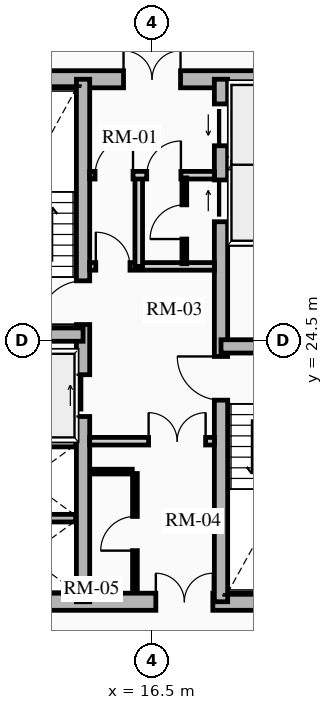
"""IFC4 building model, lengths in metres.
Left out: names, types, materials, properties, quantities, classifications, styles, units other than length and angle.
Written with IfcOpenShell. Run it as: python <this file> out.ifc"""

import sys

from ifc_helpers import new_model, si_unit, direction, frame, frame_2d, origin, place, context, subcontext, project, spatial, rectangle, extrude, source, transform, mapped, element, fill, save


model = new_model("IFC4")
c1 = context("Model", 3, precision=1e-05, world=origin(), true_north=direction((0.0, 1.0)))
c2 = subcontext(c1, "Body", "Model", "MODEL_VIEW")
j1 = project(units=[si_unit("LENGTHUNIT", "METRE"), si_unit("PLANEANGLEUNIT", "RADIAN")], contexts=[c1])
p1 = place(None, origin())
s1 = spatial("IfcSite", under=j1, at=p1, CompositionType="ELEMENT")
p2 = place(p1, origin())
s2 = spatial("IfcBuilding", under=s1, at=p2, CompositionType="ELEMENT")
p3 = place(p2, frame((0.0, 0.0, 87.61)))
s3 = spatial("IfcBuildingStorey", under=s2, at=p3, CompositionType="ELEMENT", Elevation=87.61)
p4 = place(p3, frame((11.15, 17.625, 0.0), z_axis=(0.0, 0.0, 1.0), x_axis=(1.0, 0.0, 0.0)))
e1 = element("IfcWall", 1, at=p4, inside=s3, PredefinedType="SHEAR", context=c2, shape_type="SweptSolid", body=[
    extrude(rectangle(XDim=10.7, YDim=0.45, at=frame_2d((5.35, 0.0))), origin(), (0.0, 0.0, 1.0), 2.91),
])
m1 = source(origin(), c2, "Body", "SweptSolid", [
    extrude(rectangle(XDim=1.5, YDim=2.02, at=frame_2d((0.75, 1.01))), frame((0.0, 0.235, 0.0), z_axis=(0.0, -1.0, 0.0), x_axis=(1.0, 0.0, 0.0)), (0.0, 0.0, 1.0), 0.47),
])
p5 = place(p4, frame((5.45, 0.0, 0.0)))
e2 = element("IfcOpeningElement", 2, at=p5, cuts=e1, PredefinedType="OPENING", context=c2, shape_type="MappedRepresentation", body=[
    mapped(m1, transform((0.0, 0.0, 0.0), x_axis=(1.0, 0.0, 0.0), y_axis=(0.0, 1.0, 0.0), z_axis=(0.0, 0.0, 1.0), scale=1.0)),
])
p6 = place(p3, frame((11.15, 31.375, 0.0), z_axis=(0.0, 0.0, 1.0), x_axis=(1.0, 0.0, 0.0)))
e3 = element("IfcWall", 3, at=p6, inside=s3, PredefinedType="SHEAR", context=c2, shape_type="SweptSolid", body=[
    extrude(rectangle(XDim=10.7, YDim=0.45, at=frame_2d((5.35, 0.0))), origin(), (0.0, 0.0, 1.0), 2.91),
])
p7 = place(p6, frame((4.6, 0.0, 0.0)))
e4 = element("IfcOpeningElement", 4, at=p7, cuts=e3, PredefinedType="OPENING", context=c2, shape_type="MappedRepresentation", body=[
    mapped(m1, transform((0.0, 0.0, 0.0), x_axis=(1.0, 0.0, 0.0), y_axis=(0.0, 1.0, 0.0), z_axis=(0.0, 0.0, 1.0), scale=1.0)),
])
p8 = place(p3, frame((14.685, 17.625, 0.0), z_axis=(0.0, 0.0, 1.0), x_axis=(0.0, 1.0, 0.0)))
e5 = element("IfcWall", 5, at=p8, inside=s3, PredefinedType="SHEAR", context=c2, shape_type="SweptSolid", body=[
    extrude(rectangle(XDim=13.75, YDim=0.35, at=frame_2d((6.875, 0.0))), origin(), (0.0, 0.0, 1.0), 2.91),
])
m2 = source(origin(), c2, "Body", "SweptSolid", [
    extrude(rectangle(XDim=1.1, YDim=2.015, at=frame_2d((0.55, 1.007))), frame((0.0, 0.185, 0.0), z_axis=(0.0, -1.0, 0.0), x_axis=(1.0, 0.0, 0.0)), (0.0, 0.0, 1.0), 0.37),
])
p9 = place(p8, frame((4.875, 0.0, 0.0)))
e6 = element("IfcOpeningElement", 6, at=p9, cuts=e5, PredefinedType="OPENING", context=c2, shape_type="MappedRepresentation", body=[
    mapped(m2, transform((0.0, 0.0, 0.0), x_axis=(1.0, 0.0, 0.0), y_axis=(0.0, 1.0, 0.0), z_axis=(0.0, 0.0, 1.0), scale=1.0)),
])
m3 = source(origin(), c2, "Body", "SweptSolid", [
    extrude(rectangle(XDim=1.15, YDim=2.02, at=frame_2d((0.575, 1.01))), frame((0.0, 0.185, 0.0), z_axis=(0.0, -1.0, 0.0), x_axis=(1.0, 0.0, 0.0)), (0.0, 0.0, 1.0), 0.37),
])
p10 = place(p8, frame((7.295, 0.0, 0.0)))
e7 = element("IfcOpeningElement", 7, at=p10, cuts=e5, PredefinedType="OPENING", context=c2, shape_type="MappedRepresentation", body=[
    mapped(m3, transform((0.0, 0.0, 0.0), x_axis=(1.0, 0.0, 0.0), y_axis=(0.0, 1.0, 0.0), z_axis=(0.0, 0.0, 1.0), scale=1.0)),
])
p11 = place(p3, frame((18.315, 17.625, 0.0), z_axis=(0.0, 0.0, 1.0), x_axis=(0.0, 1.0, 0.0)))
e8 = element("IfcWall", 8, at=p11, inside=s3, PredefinedType="SHEAR", context=c2, shape_type="SweptSolid", body=[
    extrude(rectangle(XDim=13.75, YDim=0.35, at=frame_2d((6.875, 0.0))), origin(), (0.0, 0.0, 1.0), 2.91),
])
p12 = place(p11, frame((10.0, 0.0, 0.0)))
e9 = element("IfcOpeningElement", 9, at=p12, cuts=e8, PredefinedType="OPENING", context=c2, shape_type="MappedRepresentation", body=[
    mapped(m2, transform((0.0, 0.0, 0.0), x_axis=(1.0, 0.0, 0.0), y_axis=(0.0, 1.0, 0.0), z_axis=(0.0, 0.0, 1.0), scale=1.0)),
])
p13 = place(p11, frame((12.0, 0.0, 0.0)))
e10 = element("IfcOpeningElement", 10, at=p13, cuts=e8, PredefinedType="OPENING", context=c2, shape_type="MappedRepresentation", body=[
    mapped(m2, transform((0.0, 0.0, 0.0), x_axis=(1.0, 0.0, 0.0), y_axis=(0.0, 1.0, 0.0), z_axis=(0.0, 0.0, 1.0), scale=1.0)),
])
p14 = place(p11, frame((5.305, 0.0, 0.0)))
e11 = element("IfcOpeningElement", 11, at=p14, cuts=e8, PredefinedType="OPENING", context=c2, shape_type="MappedRepresentation", body=[
    mapped(m3, transform((0.0, 0.0, 0.0), x_axis=(1.0, 0.0, 0.0), y_axis=(0.0, 1.0, 0.0), z_axis=(0.0, 0.0, 1.0), scale=1.0)),
])
for number, where, z_axis, x_axis in (
    (12, (11.4, 24.655, 0.0), (0.0, 0.0, 1.0), (1.0, 0.0, 0.0)),
    (13, (18.315, 24.345, 0.0), (0.0, 0.0, 1.0), (1.0, 0.0, 0.0)),
):
    element("IfcWall", number, at=place(p3, frame(where, z_axis=z_axis, x_axis=x_axis)), inside=s3, PredefinedType="SHEAR", context=c2, shape_type="SweptSolid", body=[
        extrude(rectangle(XDim=3.285, YDim=0.35, at=frame_2d((1.643, 0.0))), origin(), (0.0, 0.0, 1.0), 2.91),
    ])
for number, where, z_axis, x_axis in (
    (14, (11.52, 21.8, 0.0), (0.0, 0.0, 1.0), (1.0, 0.0, 0.0)),
    (15, (11.52, 19.825, 0.0), (0.0, 0.0, 1.0), (1.0, 0.0, 0.0)),
    (16, (18.51, 27.13, 0.0), (0.0, 0.0, 1.0), (1.0, 0.0, 0.0)),
    (17, (18.51, 29.175, 0.0), (0.0, 0.0, 1.0), (1.0, 0.0, 0.0)),
):
    element("IfcWall", number, at=place(p3, frame(where, z_axis=z_axis, x_axis=x_axis)), inside=s3, PredefinedType="SHEAR", context=c2, shape_type="SweptSolid", body=[
        extrude(rectangle(XDim=2.97, YDim=0.2, at=frame_2d((1.485, 0.0))), origin(), (0.0, 0.0, 1.0), 2.91),
    ])
p15 = place(p3, frame((14.86, 21.85, 0.0), z_axis=(0.0, 0.0, 1.0), x_axis=(1.0, 0.0, 0.0)))
e18 = element("IfcWall", 18, at=p15, inside=s3, PredefinedType="PARTITIONING", context=c2, shape_type="SweptSolid", body=[
    extrude(rectangle(XDim=3.28, YDim=0.2, at=frame_2d((1.64, 0.0))), origin(), (0.0, 0.0, 1.0), 2.655),
])
m4 = source(origin(), c2, "Body", "SweptSolid", [
    extrude(rectangle(XDim=1.5, YDim=2.02, at=frame_2d((0.75, 1.01))), frame((0.0, 0.11, 0.0), z_axis=(0.0, -1.0, 0.0), x_axis=(1.0, 0.0, 0.0)), (0.0, 0.0, 1.0), 0.22),
])
p16 = place(p15, frame((1.55, 0.0, 0.0)))
e19 = element("IfcOpeningElement", 19, at=p16, cuts=e18, PredefinedType="OPENING", context=c2, shape_type="MappedRepresentation", body=[
    mapped(m4, transform((0.0, 0.0, 0.0), x_axis=(1.0, 0.0, 0.0), y_axis=(0.0, 1.0, 0.0), z_axis=(0.0, 0.0, 1.0), scale=1.0)),
])
p17 = place(p3, frame((14.86, 26.45, 0.0), z_axis=(0.0, 0.0, 1.0), x_axis=(1.0, 0.0, 0.0)))
e20 = element("IfcWall", 20, at=p17, inside=s3, PredefinedType="PARTITIONING", context=c2, shape_type="SweptSolid", body=[
    extrude(rectangle(XDim=3.28, YDim=0.2, at=frame_2d((1.64, 0.0))), origin(), (0.0, 0.0, 1.0), 2.655),
])
m5 = source(origin(), c2, "Body", "SweptSolid", [
    extrude(rectangle(XDim=0.9, YDim=2.005, at=frame_2d((0.45, 1.002))), frame((0.0, 0.11, 0.0), z_axis=(0.0, -1.0, 0.0), x_axis=(1.0, 0.0, 0.0)), (0.0, 0.0, 1.0), 0.22),
])
p18 = place(p17, frame((0.16, 0.0, 0.0)))
e21 = element("IfcOpeningElement", 21, at=p18, cuts=e20, PredefinedType="OPENING", context=c2, shape_type="MappedRepresentation", body=[
    mapped(m5, transform((0.0, 0.0, 0.0), x_axis=(1.0, 0.0, 0.0), y_axis=(0.0, 1.0, 0.0), z_axis=(0.0, 0.0, 1.0), scale=1.0)),
])
p19 = place(p3, frame((16.15, 26.45, 0.0), z_axis=(0.0, 0.0, 1.0), x_axis=(0.0, 1.0, 0.0)))
e22 = element("IfcWall", 22, at=p19, inside=s3, PredefinedType="PARTITIONING", context=c2, shape_type="SweptSolid", body=[
    extrude(rectangle(XDim=2.4, YDim=0.2, at=frame_2d((1.2, 0.0))), origin(), (0.0, 0.0, 1.0), 2.655),
])
p20 = place(p3, frame((14.86, 28.85, 0.0), z_axis=(0.0, 0.0, 1.0), x_axis=(1.0, 0.0, 0.0)))
e23 = element("IfcWall", 23, at=p20, inside=s3, PredefinedType="PARTITIONING", context=c2, shape_type="SweptSolid", body=[
    extrude(rectangle(XDim=3.28, YDim=0.2, at=frame_2d((1.64, 0.0))), origin(), (0.0, 0.0, 1.0), 2.655),
])
m6 = source(origin(), c2, "Body", "SweptSolid", [
    extrude(rectangle(XDim=1.0, YDim=2.015, at=frame_2d((0.5, 1.007))), frame((0.0, 0.11, 0.0), z_axis=(0.0, -1.0, 0.0), x_axis=(1.0, 0.0, 0.0)), (0.0, 0.0, 1.0), 0.22),
])
p21 = place(p20, frame((0.14, 0.0, 0.0)))
e24 = element("IfcOpeningElement", 24, at=p21, cuts=e23, PredefinedType="OPENING", context=c2, shape_type="MappedRepresentation", body=[
    mapped(m6, transform((0.0, 0.0, 0.0), x_axis=(1.0, 0.0, 0.0), y_axis=(0.0, 1.0, 0.0), z_axis=(0.0, 0.0, 1.0), scale=1.0)),
])
p22 = place(p20, frame((1.5, 0.0, 0.0)))
e25 = element("IfcOpeningElement", 25, at=p22, cuts=e23, PredefinedType="OPENING", context=c2, shape_type="MappedRepresentation", body=[
    mapped(m5, transform((0.0, 0.0, 0.0), x_axis=(1.0, 0.0, 0.0), y_axis=(0.0, 1.0, 0.0), z_axis=(0.0, 0.0, 1.0), scale=1.0)),
])
p23 = place(p3, frame((16.05, 17.92, 0.0), z_axis=(0.0, 0.0, 1.0), x_axis=(0.0, 1.0, 0.0)))
e26 = element("IfcWall", 26, at=p23, inside=s3, PredefinedType="PARTITIONING", context=c2, shape_type="SweptSolid", body=[
    extrude(rectangle(XDim=3.08, YDim=0.125, at=frame_2d((1.54, 0.0))), origin(), (0.0, 0.0, 1.0), 2.655),
])
m7 = source(origin(), c2, "Body", "SweptSolid", [
    extrude(rectangle(XDim=0.9, YDim=2.005, at=frame_2d((0.45, 1.002))), frame((0.0, 0.073, 0.0), z_axis=(0.0, -1.0, 0.0), x_axis=(1.0, 0.0, 0.0)), (0.0, 0.0, 1.0), 0.145),
])
p24 = place(p23, frame((1.05, 0.0, 0.0)))
e27 = element("IfcOpeningElement", 27, at=p24, cuts=e26, PredefinedType="OPENING", context=c2, shape_type="MappedRepresentation", body=[
    mapped(m7, transform((0.0, 0.0, 0.0), x_axis=(1.0, 0.0, 0.0), y_axis=(0.0, 1.0, 0.0), z_axis=(0.0, 0.0, 1.0), scale=1.0)),
])
p25 = place(p3, frame((14.88, 21.05, 0.0), z_axis=(0.0, 0.0, 1.0), x_axis=(1.0, 0.0, 0.0)))
e28 = element("IfcWall", 28, at=p25, inside=s3, PredefinedType="PARTITIONING", context=c2, shape_type="SweptSolid", body=[
    extrude(rectangle(XDim=1.1, YDim=0.125, at=frame_2d((0.55, 0.0))), origin(), (0.0, 0.0, 1.0), 2.655),
])
p26 = place(p3, frame((17.35, 26.52, 0.0), z_axis=(0.0, 0.0, 1.0), x_axis=(0.0, 1.0, 0.0)))
e29 = element("IfcWall", 29, at=p26, inside=s3, PredefinedType="PARTITIONING", context=c2, shape_type="SweptSolid", body=[
    extrude(rectangle(XDim=2.26, YDim=0.125, at=frame_2d((1.13, 0.0))), origin(), (0.0, 0.0, 1.0), 2.655),
])
p27 = place(p26, frame((0.65, 0.0, 0.0)))
e30 = element("IfcOpeningElement", 30, at=p27, cuts=e29, PredefinedType="OPENING", context=c2, shape_type="MappedRepresentation", body=[
    mapped(m7, transform((0.0, 0.0, 0.0), x_axis=(1.0, 0.0, 0.0), y_axis=(0.0, 1.0, 0.0), z_axis=(0.0, 0.0, 1.0), scale=1.0)),
])
m8 = source(origin(), c2, "Body", "SweptSolid", [
    extrude(rectangle(XDim=1.1, YDim=2.015, at=frame_2d((0.55, 1.007))), frame((0.0, 0.025, 0.0), z_axis=(0.0, -1.0, 0.0), x_axis=(1.0, 0.0, 0.0)), (0.0, 0.0, 1.0), 0.05),
])
p28 = place(p9, origin())
e31 = element("IfcDoor", 31, at=p28, inside=s3, OperationType="SLIDING_TO_RIGHT", PredefinedType="DOOR", context=c2, shape_type="MappedRepresentation", body=[
    mapped(m8, transform((0.0, 0.0, 0.0), x_axis=(1.0, 0.0, 0.0), y_axis=(0.0, 1.0, 0.0), z_axis=(0.0, 0.0, 1.0), scale=1.0)),
])
fill(e6, e31)
p29 = place(p12, origin())
e32 = element("IfcDoor", 32, at=p29, inside=s3, OperationType="SLIDING_TO_RIGHT", PredefinedType="DOOR", context=c2, shape_type="MappedRepresentation", body=[
    mapped(m8, transform((0.0, 0.0, 0.0), x_axis=(1.0, 0.0, 0.0), y_axis=(0.0, 1.0, 0.0), z_axis=(0.0, 0.0, 1.0), scale=1.0)),
])
fill(e9, e32)
p30 = place(p13, origin())
e33 = element("IfcDoor", 33, at=p30, inside=s3, OperationType="SLIDING_TO_LEFT", PredefinedType="DOOR", context=c2, shape_type="MappedRepresentation", body=[
    mapped(m8, transform((0.0, 0.0, 0.0), x_axis=(1.0, 0.0, 0.0), y_axis=(0.0, 1.0, 0.0), z_axis=(0.0, 0.0, 1.0), scale=1.0)),
])
fill(e10, e33)
m9 = source(origin(), c2, "Body", "SweptSolid", [
    extrude(rectangle(XDim=1.15, YDim=2.02, at=frame_2d((0.575, 1.01))), frame((0.0, 0.025, 0.0), z_axis=(0.0, -1.0, 0.0), x_axis=(1.0, 0.0, 0.0)), (0.0, 0.0, 1.0), 0.05),
])
p31 = place(p10, origin())
e34 = element("IfcDoor", 34, at=p31, inside=s3, OperationType="SINGLE_SWING_LEFT", PredefinedType="DOOR", context=c2, shape_type="MappedRepresentation", body=[
    mapped(m9, transform((0.0, 0.0, 0.0), x_axis=(1.0, 0.0, 0.0), y_axis=(0.0, 1.0, 0.0), z_axis=(0.0, 0.0, 1.0), scale=1.0)),
])
fill(e7, e34)
p32 = place(p14, origin())
e35 = element("IfcDoor", 35, at=p32, inside=s3, OperationType="SINGLE_SWING_RIGHT", PredefinedType="DOOR", context=c2, shape_type="MappedRepresentation", body=[
    mapped(m9, transform((0.0, 0.0, 0.0), x_axis=(1.0, 0.0, 0.0), y_axis=(0.0, 1.0, 0.0), z_axis=(0.0, 0.0, 1.0), scale=1.0)),
])
fill(e11, e35)
m10 = source(origin(), c2, "Body", "SweptSolid", [
    extrude(rectangle(XDim=1.5, YDim=2.02, at=frame_2d((0.75, 1.01))), frame((0.0, 0.025, 0.0), z_axis=(0.0, -1.0, 0.0), x_axis=(1.0, 0.0, 0.0)), (0.0, 0.0, 1.0), 0.05),
])
p33 = place(p7, origin())
e36 = element("IfcDoor", 36, at=p33, inside=s3, OperationType="DOUBLE_DOOR_SINGLE_SWING", PredefinedType="DOOR", context=c2, shape_type="MappedRepresentation", body=[
    mapped(m10, transform((0.0, 0.0, 0.0), x_axis=(1.0, 0.0, 0.0), y_axis=(0.0, 1.0, 0.0), z_axis=(0.0, 0.0, 1.0), scale=1.0)),
])
fill(e4, e36)
p34 = place(p5, origin())
e37 = element("IfcDoor", 37, at=p34, inside=s3, OperationType="DOUBLE_DOOR_SINGLE_SWING", PredefinedType="DOOR", context=c2, shape_type="MappedRepresentation", body=[
    mapped(m10, transform((0.0, 0.0, 0.0), x_axis=(1.0, 0.0, 0.0), y_axis=(0.0, 1.0, 0.0), z_axis=(0.0, 0.0, 1.0), scale=1.0)),
])
fill(e2, e37)
p35 = place(p16, origin())
e38 = element("IfcDoor", 38, at=p35, inside=s3, OperationType="DOUBLE_DOOR_SINGLE_SWING", PredefinedType="DOOR", context=c2, shape_type="MappedRepresentation", body=[
    mapped(m10, transform((0.0, 0.0, 0.0), x_axis=(1.0, 0.0, 0.0), y_axis=(0.0, 1.0, 0.0), z_axis=(0.0, 0.0, 1.0), scale=1.0)),
])
fill(e19, e38)
m11 = source(origin(), c2, "Body", "SweptSolid", [
    extrude(rectangle(XDim=0.9, YDim=2.005, at=frame_2d((0.45, 1.002))), frame((0.0, 0.025, 0.0), z_axis=(0.0, -1.0, 0.0), x_axis=(1.0, 0.0, 0.0)), (0.0, 0.0, 1.0), 0.05),
])
p36 = place(p18, origin())
e39 = element("IfcDoor", 39, at=p36, inside=s3, OperationType="SINGLE_SWING_LEFT", PredefinedType="DOOR", context=c2, shape_type="MappedRepresentation", body=[
    mapped(m11, transform((0.0, 0.0, 0.0), x_axis=(1.0, 0.0, 0.0), y_axis=(0.0, 1.0, 0.0), z_axis=(0.0, 0.0, 1.0), scale=1.0)),
])
fill(e21, e39)
m12 = source(origin(), c2, "Body", "SweptSolid", [
    extrude(rectangle(XDim=1.0, YDim=2.015, at=frame_2d((0.5, 1.007))), frame((0.0, 0.025, 0.0), z_axis=(0.0, -1.0, 0.0), x_axis=(1.0, 0.0, 0.0)), (0.0, 0.0, 1.0), 0.05),
])
p37 = place(p21, origin())
e40 = element("IfcDoor", 40, at=p37, inside=s3, OperationType="SINGLE_SWING_RIGHT", PredefinedType="DOOR", context=c2, shape_type="MappedRepresentation", body=[
    mapped(m12, transform((0.0, 0.0, 0.0), x_axis=(1.0, 0.0, 0.0), y_axis=(0.0, 1.0, 0.0), z_axis=(0.0, 0.0, 1.0), scale=1.0)),
])
fill(e24, e40)
p38 = place(p24, origin())
e41 = element("IfcDoor", 41, at=p38, inside=s3, OperationType="SINGLE_SWING_LEFT", PredefinedType="DOOR", context=c2, shape_type="MappedRepresentation", body=[
    mapped(m11, transform((0.0, 0.0, 0.0), x_axis=(1.0, 0.0, 0.0), y_axis=(0.0, 1.0, 0.0), z_axis=(0.0, 0.0, 1.0), scale=1.0)),
])
fill(e27, e41)
p39 = place(p22, origin())
e42 = element("IfcDoor", 42, at=p39, inside=s3, OperationType="SINGLE_SWING_RIGHT", PredefinedType="DOOR", context=c2, shape_type="MappedRepresentation", body=[
    mapped(m11, transform((0.0, 0.0, 0.0), x_axis=(1.0, 0.0, 0.0), y_axis=(0.0, 1.0, 0.0), z_axis=(0.0, 0.0, 1.0), scale=1.0)),
])
fill(e25, e42)
p40 = place(p27, origin())
e43 = element("IfcDoor", 43, at=p40, inside=s3, OperationType="SINGLE_SWING_LEFT", PredefinedType="DOOR", context=c2, shape_type="MappedRepresentation", body=[
    mapped(m11, transform((0.0, 0.0, 0.0), x_axis=(1.0, 0.0, 0.0), y_axis=(0.0, 1.0, 0.0), z_axis=(0.0, 0.0, 1.0), scale=1.0)),
])
fill(e30, e43)
save(model, sys.argv[1])
